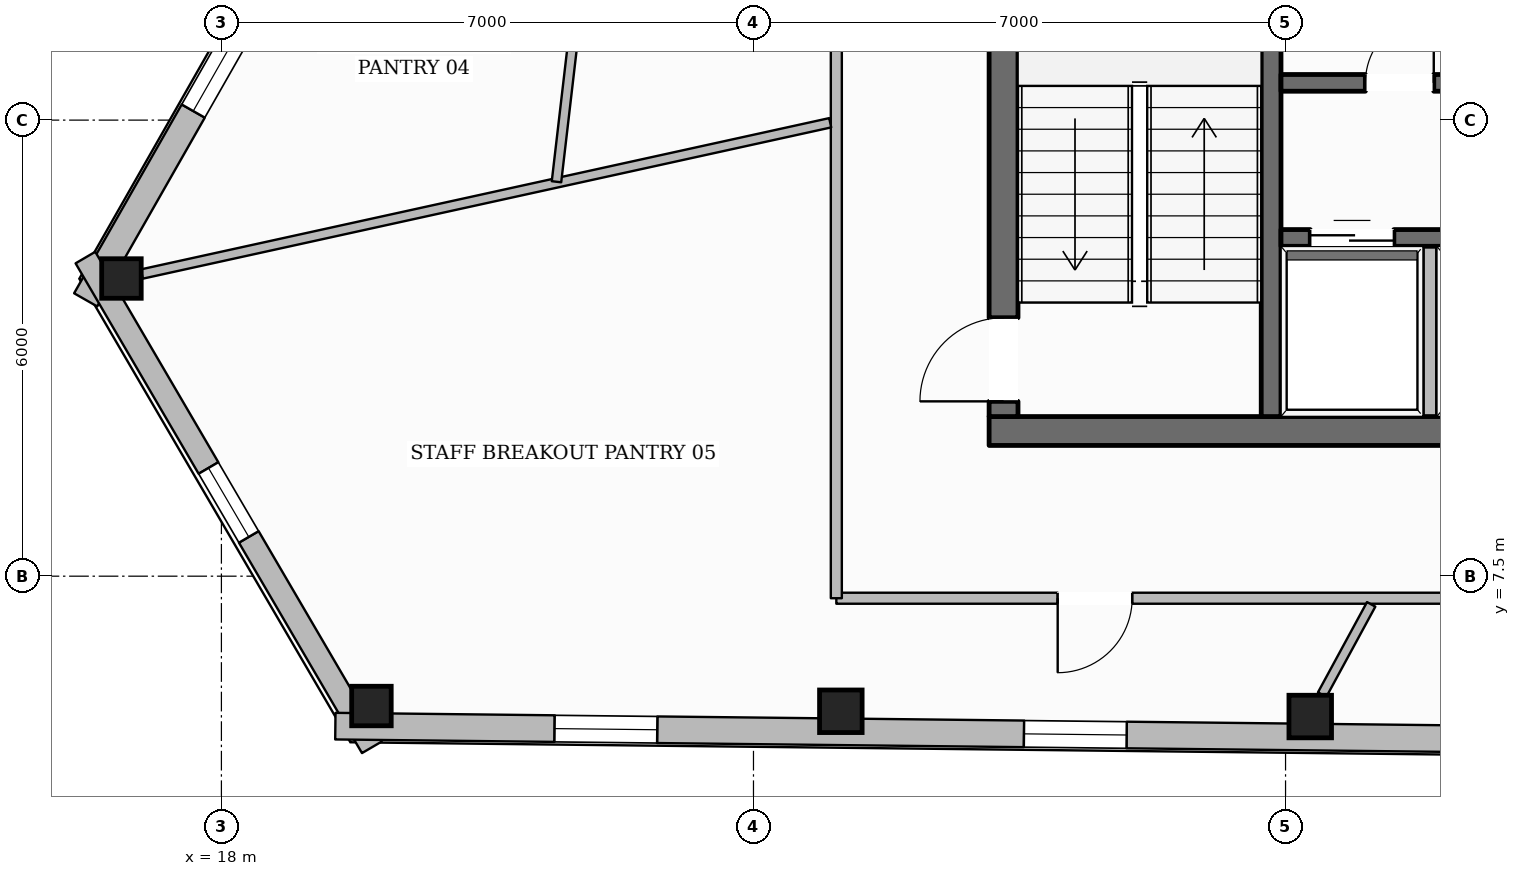
"""IFC4 building model, lengths in metres.
Left out: names, types, materials, properties, quantities, classifications, styles, units other than length and angle.
Written with IfcOpenShell. Run it as: python <this file> out.ifc"""

import sys

from ifc_helpers import new_model, si_unit, direction, frame, frame_2d, origin, origin_2d, place, context, subcontext, project, spatial, rectangle, hollow_rectangle, extrude, element, fill, save


model = new_model("IFC4")
c1 = context("Model", 3, precision=1e-05, world=origin(), true_north=direction((0.0, 1.0)))
c2 = subcontext(c1, "Body", "Model", "MODEL_VIEW")
j1 = project(units=[si_unit("LENGTHUNIT", "METRE"), si_unit("PLANEANGLEUNIT", "RADIAN")], contexts=[c1])
p1 = place(None, origin())
s1 = spatial("IfcSite", under=j1, at=p1, CompositionType="ELEMENT")
p2 = place(p1, origin())
s2 = spatial("IfcBuilding", under=s1, at=p2, CompositionType="ELEMENT")
p3 = place(p2, frame((0.0, 0.0, 254.9)))
s3 = spatial("IfcBuildingStorey", under=s2, at=p3, CompositionType="ELEMENT", Elevation=254.9)
p4 = place(p3, frame((28.1, 9.41, 0.0), z_axis=(0.0, 0.0, 1.0), x_axis=(1.0, 0.0, 0.0)))
e1 = element("IfcWall", 1, at=p4, inside=s3, PredefinedType="SOLIDWALL", context=c2, shape_type="SweptSolid", body=[
    extrude(rectangle(XDim=19.8, YDim=0.38, at=frame_2d((9.9, 0.0))), origin(), (0.0, 0.0, 1.0), 3.61),
])
p5 = place(p4, frame((10.4, 0.0, 0.0)))
e2 = element("IfcOpeningElement", 2, at=p5, cuts=e1, PredefinedType="OPENING", context=c2, shape_type="SweptSolid", body=[
    extrude(rectangle(XDim=1.4, YDim=2.2, at=frame_2d((0.7, 1.1))), frame((0.0, 0.2, 0.0), z_axis=(0.0, -1.0, 0.0), x_axis=(1.0, 0.0, 0.0)), (0.0, 0.0, 1.0), 0.4),
])
p6 = place(p3, frame((28.29, 9.6, 0.0), z_axis=(0.0, 0.0, 1.0), x_axis=(0.0, 1.0, 0.0)))
e3 = element("IfcWall", 3, at=p6, inside=s3, PredefinedType="SOLIDWALL", context=c2, shape_type="SweptSolid", body=[
    extrude(rectangle(XDim=13.0, YDim=0.38, at=frame_2d((6.5, 0.0))), origin(), (0.0, 0.0, 1.0), 3.61),
])
p7 = place(p6, frame((0.2, 0.0, 0.0)))
e4 = element("IfcOpeningElement", 4, at=p7, cuts=e3, PredefinedType="OPENING", context=c2, shape_type="SweptSolid", body=[
    extrude(rectangle(XDim=1.1, YDim=2.15, at=frame_2d((0.55, 1.075))), frame((0.0, 0.2, 0.0), z_axis=(0.0, -1.0, 0.0), x_axis=(1.0, 0.0, 0.0)), (0.0, 0.0, 1.0), 0.4),
])
p8 = place(p6, frame((8.4, 0.0, 0.0)))
e5 = element("IfcOpeningElement", 5, at=p8, cuts=e3, PredefinedType="OPENING", context=c2, shape_type="SweptSolid", body=[
    extrude(rectangle(XDim=0.9, YDim=2.1, at=frame_2d((0.45, 1.05))), frame((0.0, 0.2, 0.0), z_axis=(0.0, -1.0, 0.0), x_axis=(1.0, 0.0, 0.0)), (0.0, 0.0, 1.0), 0.4),
])
p9 = place(p3, frame((31.81, 9.6, 0.0), z_axis=(0.0, 0.0, 1.0), x_axis=(0.0, 1.0, 0.0)))
e6 = element("IfcWall", 6, at=p9, inside=s3, PredefinedType="SHEAR", context=c2, shape_type="SweptSolid", body=[
    extrude(rectangle(XDim=13.0, YDim=0.26, at=frame_2d((6.5, 0.0))), origin(), (0.0, 0.0, 1.0), 3.61),
])
p10 = place(p9, frame((10.925, 0.0, 0.0)))
e7 = element("IfcOpeningElement", 7, at=p10, cuts=e6, PredefinedType="OPENING", context=c2, shape_type="SweptSolid", body=[
    extrude(rectangle(XDim=1.25, YDim=2.25, at=frame_2d((0.625, 1.125))), frame((0.0, 0.14, 0.0), z_axis=(0.0, -1.0, 0.0), x_axis=(1.0, 0.0, 0.0)), (0.0, 0.0, 1.0), 0.28),
])
p11 = place(p3, frame((31.94, 13.99, 0.0), z_axis=(0.0, 0.0, 1.0), x_axis=(1.0, 0.0, 0.0)))
e8 = element("IfcWall", 8, at=p11, inside=s3, PredefinedType="SOLIDWALL", context=c2, shape_type="SweptSolid", body=[
    extrude(rectangle(XDim=12.12, YDim=0.22, at=frame_2d((6.06, 0.0))), origin(), (0.0, 0.0, 1.0), 3.61),
])
p12 = place(p11, frame((1.11, 0.0, 0.0)))
e9 = element("IfcOpeningElement", 9, at=p12, cuts=e8, PredefinedType="OPENING", context=c2, shape_type="SweptSolid", body=[
    extrude(rectangle(XDim=0.9, YDim=2.1, at=frame_2d((0.45, 1.05))), frame((0.0, 0.12, 0.0), z_axis=(0.0, -1.0, 0.0), x_axis=(1.0, 0.0, 0.0)), (0.0, 0.0, 1.0), 0.24),
])
p13 = place(p11, frame((5.16, 0.0, 0.0)))
e10 = element("IfcOpeningElement", 10, at=p13, cuts=e8, PredefinedType="OPENING", context=c2, shape_type="SweptSolid", body=[
    extrude(rectangle(XDim=0.9, YDim=2.1, at=frame_2d((0.45, 1.05))), frame((0.0, 0.12, 0.0), z_axis=(0.0, -1.0, 0.0), x_axis=(1.0, 0.0, 0.0)), (0.0, 0.0, 1.0), 0.24),
])
p14 = place(p11, frame((9.61, 0.0, 0.0)))
e11 = element("IfcOpeningElement", 11, at=p14, cuts=e8, PredefinedType="OPENING", context=c2, shape_type="SweptSolid", body=[
    extrude(rectangle(XDim=0.9, YDim=2.1, at=frame_2d((0.45, 1.05))), frame((0.0, 0.12, 0.0), z_axis=(0.0, -1.0, 0.0), x_axis=(1.0, 0.0, 0.0)), (0.0, 0.0, 1.0), 0.24),
])
p15 = place(p3, frame((31.94, 11.95, 0.0), z_axis=(0.0, 0.0, 1.0), x_axis=(1.0, 0.0, 0.0)))
e12 = element("IfcWall", 12, at=p15, inside=s3, PredefinedType="SOLIDWALL", context=c2, shape_type="SweptSolid", body=[
    extrude(rectangle(XDim=6.19, YDim=0.22, at=frame_2d((3.095, 0.0))), origin(), (0.0, 0.0, 1.0), 3.61),
])
p16 = place(p15, frame((0.385, 0.0, 0.0)))
e13 = element("IfcOpeningElement", 13, at=p16, cuts=e12, PredefinedType="OPENING", context=c2, shape_type="SweptSolid", body=[
    extrude(rectangle(XDim=1.1, YDim=2.2, at=frame_2d((0.55, 1.1))), frame((0.0, 0.12, 0.0), z_axis=(0.0, -1.0, 0.0), x_axis=(1.0, 0.0, 0.0)), (0.0, 0.0, 1.0), 0.24),
])
p17 = place(p15, frame((2.435, 0.0, 0.0)))
e14 = element("IfcOpeningElement", 14, at=p17, cuts=e12, PredefinedType="OPENING", context=c2, shape_type="SweptSolid", body=[
    extrude(rectangle(XDim=1.1, YDim=2.2, at=frame_2d((0.55, 1.1))), frame((0.0, 0.12, 0.0), z_axis=(0.0, -1.0, 0.0), x_axis=(1.0, 0.0, 0.0)), (0.0, 0.0, 1.0), 0.24),
])
p18 = place(p15, frame((4.485, 0.0, 0.0)))
e15 = element("IfcOpeningElement", 15, at=p18, cuts=e12, PredefinedType="OPENING", context=c2, shape_type="SweptSolid", body=[
    extrude(rectangle(XDim=1.1, YDim=2.2, at=frame_2d((0.55, 1.1))), frame((0.0, 0.12, 0.0), z_axis=(0.0, -1.0, 0.0), x_axis=(1.0, 0.0, 0.0)), (0.0, 0.0, 1.0), 0.24),
])
for number, where, z_axis, x_axis in (
    (16, (16.685, 11.416, 0.0), (0.0, 0.0, 1.0), (1.0, 0.0, 0.0)),
    (17, (19.974, 5.792, 0.0), (0.0, 0.0, 1.0), (1.0, 0.0, 0.0)),
):
    element("IfcColumn", number, at=place(p3, frame(where, z_axis=z_axis, x_axis=x_axis)), inside=s3, PredefinedType="COLUMN", context=c2, shape_type="SweptSolid", body=[
        extrude(hollow_rectangle(XDim=0.52, YDim=0.52, WallThickness=0.024, at=origin_2d()), origin(), (0.0, 0.0, 1.0), 3.61),
    ])
for number, where, z_axis, x_axis in (
    (18, (26.149, 5.723, 0.0), (0.0, 0.0, 1.0), (1.0, 0.0, 0.0)),
    (19, (32.325, 5.654, 0.0), (0.0, 0.0, 1.0), (1.0, 0.0, 0.0)),
):
    element("IfcColumn", number, at=place(p3, frame(where, z_axis=z_axis, x_axis=x_axis)), inside=s3, PredefinedType="COLUMN", context=c2, shape_type="SweptSolid", body=[
        extrude(hollow_rectangle(XDim=0.56, YDim=0.56, WallThickness=0.025, at=origin_2d()), origin(), (0.0, 0.0, 1.0), 3.61),
    ])
p19 = place(p3, frame((16.214, 11.135, 0.0), z_axis=(0.0, 0.0, 1.0), x_axis=(0.49510347201, 0.868834018673, 0.0)))
e20 = element("IfcWall", 20, at=p19, inside=s3, PredefinedType="STANDARD", context=c2, shape_type="SweptSolid", body=[
    extrude(rectangle(XDim=37.643, YDim=0.35, at=frame_2d((18.822, 0.0))), origin(), (0.0, 0.0, 1.0), 3.196),
])
p20 = place(p19, frame((33.429, 0.0, 0.65)))
e21 = element("IfcOpeningElement", 21, at=p20, cuts=e20, PredefinedType="OPENING", context=c2, shape_type="SweptSolid", body=[
    extrude(rectangle(XDim=1.35, YDim=1.75, at=frame_2d((0.675, 0.875))), frame((0.0, 0.185, 0.0), z_axis=(0.0, -1.0, 0.0), x_axis=(1.0, 0.0, 0.0)), (0.0, 0.0, 1.0), 0.37),
])
p21 = place(p19, frame((27.315, 0.0, 0.65)))
e22 = element("IfcOpeningElement", 22, at=p21, cuts=e20, PredefinedType="OPENING", context=c2, shape_type="SweptSolid", body=[
    extrude(rectangle(XDim=1.35, YDim=1.75, at=frame_2d((0.675, 0.875))), frame((0.0, 0.185, 0.0), z_axis=(0.0, -1.0, 0.0), x_axis=(1.0, 0.0, 0.0)), (0.0, 0.0, 1.0), 0.37),
])
p22 = place(p19, frame((15.087, 0.0, 0.65)))
e23 = element("IfcOpeningElement", 23, at=p22, cuts=e20, PredefinedType="OPENING", context=c2, shape_type="SweptSolid", body=[
    extrude(rectangle(XDim=1.35, YDim=1.75, at=frame_2d((0.675, 0.875))), frame((0.0, 0.185, 0.0), z_axis=(0.0, -1.0, 0.0), x_axis=(1.0, 0.0, 0.0)), (0.0, 0.0, 1.0), 0.37),
])
p23 = place(p19, frame((8.973, 0.0, 0.65)))
e24 = element("IfcOpeningElement", 24, at=p23, cuts=e20, PredefinedType="OPENING", context=c2, shape_type="SweptSolid", body=[
    extrude(rectangle(XDim=1.35, YDim=1.75, at=frame_2d((0.675, 0.875))), frame((0.0, 0.185, 0.0), z_axis=(0.0, -1.0, 0.0), x_axis=(1.0, 0.0, 0.0)), (0.0, 0.0, 1.0), 0.37),
])
p24 = place(p19, frame((2.859, 0.0, 0.65)))
e25 = element("IfcOpeningElement", 25, at=p24, cuts=e20, PredefinedType="OPENING", context=c2, shape_type="SweptSolid", body=[
    extrude(rectangle(XDim=1.35, YDim=1.75, at=frame_2d((0.675, 0.875))), frame((0.0, 0.185, 0.0), z_axis=(0.0, -1.0, 0.0), x_axis=(1.0, 0.0, 0.0)), (0.0, 0.0, 1.0), 0.37),
])
p25 = place(p3, frame((19.979, 5.248, 0.0), z_axis=(0.0, 0.0, 1.0), x_axis=(-0.50480008765, 0.863236277915, 0.0)))
e26 = element("IfcWall", 26, at=p25, inside=s3, PredefinedType="STANDARD", context=c2, shape_type="SweptSolid", body=[
    extrude(rectangle(XDim=7.464, YDim=0.3, at=frame_2d((3.732, 0.0))), origin(), (0.0, 0.0, 1.0), 3.196),
])
p26 = place(p25, frame((3.207, 0.0, 0.65)))
e27 = element("IfcOpeningElement", 27, at=p26, cuts=e26, PredefinedType="OPENING", context=c2, shape_type="SweptSolid", body=[
    extrude(rectangle(XDim=1.05, YDim=1.7, at=frame_2d((0.525, 0.85))), frame((0.0, 0.16, 0.0), z_axis=(0.0, -1.0, 0.0), x_axis=(1.0, 0.0, 0.0)), (0.0, 0.0, 1.0), 0.32),
])
p27 = place(p3, frame((57.506, 5.102, 0.0), z_axis=(0.0, 0.0, 1.0), x_axis=(-0.999937327785, 0.011195557226, 0.0)))
e28 = element("IfcWall", 28, at=p27, inside=s3, PredefinedType="STANDARD", context=c2, shape_type="SweptSolid", body=[
    extrude(rectangle(XDim=38.01, YDim=0.35, at=frame_2d((19.005, 0.0))), origin(), (0.0, 0.0, 1.0), 3.196),
])
p28 = place(p27, frame((33.775, 0.0, 0.65)))
e29 = element("IfcOpeningElement", 29, at=p28, cuts=e28, PredefinedType="OPENING", context=c2, shape_type="SweptSolid", body=[
    extrude(rectangle(XDim=1.35, YDim=1.75, at=frame_2d((0.675, 0.875))), frame((0.0, 0.185, 0.0), z_axis=(0.0, -1.0, 0.0), x_axis=(1.0, 0.0, 0.0)), (0.0, 0.0, 1.0), 0.37),
])
p29 = place(p27, frame((27.599, 0.0, 0.65)))
e30 = element("IfcOpeningElement", 30, at=p29, cuts=e28, PredefinedType="OPENING", context=c2, shape_type="SweptSolid", body=[
    extrude(rectangle(XDim=1.35, YDim=1.75, at=frame_2d((0.675, 0.875))), frame((0.0, 0.185, 0.0), z_axis=(0.0, -1.0, 0.0), x_axis=(1.0, 0.0, 0.0)), (0.0, 0.0, 1.0), 0.37),
])
p30 = place(p27, frame((15.247, 0.0, 0.65)))
e31 = element("IfcOpeningElement", 31, at=p30, cuts=e28, PredefinedType="OPENING", context=c2, shape_type="SweptSolid", body=[
    extrude(rectangle(XDim=1.35, YDim=1.75, at=frame_2d((0.675, 0.875))), frame((0.0, 0.185, 0.0), z_axis=(0.0, -1.0, 0.0), x_axis=(1.0, 0.0, 0.0)), (0.0, 0.0, 1.0), 0.37),
])
p31 = place(p27, frame((9.071, 0.0, 0.65)))
e32 = element("IfcOpeningElement", 32, at=p31, cuts=e28, PredefinedType="OPENING", context=c2, shape_type="SweptSolid", body=[
    extrude(rectangle(XDim=1.35, YDim=1.75, at=frame_2d((0.675, 0.875))), frame((0.0, 0.185, 0.0), z_axis=(0.0, -1.0, 0.0), x_axis=(1.0, 0.0, 0.0)), (0.0, 0.0, 1.0), 0.37),
])
p32 = place(p27, frame((2.896, 0.0, 0.65)))
e33 = element("IfcOpeningElement", 33, at=p32, cuts=e28, PredefinedType="OPENING", context=c2, shape_type="SweptSolid", body=[
    extrude(rectangle(XDim=1.35, YDim=1.75, at=frame_2d((0.675, 0.875))), frame((0.0, 0.185, 0.0), z_axis=(0.0, -1.0, 0.0), x_axis=(1.0, 0.0, 0.0)), (0.0, 0.0, 1.0), 0.37),
])
p33 = place(p3, frame((33.9, 9.49, 0.0), z_axis=(0.0, 0.0, 1.0), x_axis=(0.0, 1.0, 0.0)))
e34 = element("IfcWall", 34, at=p33, inside=s3, PredefinedType="PARTITIONING", context=c2, shape_type="SweptSolid", body=[
    extrude(rectangle(XDim=2.35, YDim=0.165, at=frame_2d((1.175, 0.0))), origin(), (0.0, 0.0, 1.0), 3.61),
])
p34 = place(p3, frame((49.91, 7.21, 0.0), z_axis=(0.0, 0.0, 1.0), x_axis=(-1.0, 0.0, 0.0)))
e35 = element("IfcWall", 35, at=p34, inside=s3, PredefinedType="PARTITIONING", context=c2, shape_type="SweptSolid", body=[
    extrude(rectangle(XDim=23.82, YDim=0.145, at=frame_2d((11.91, 0.0))), origin(), (0.0, 0.0, 1.0), 3.61),
])
p35 = place(p34, frame((19.928, 0.0, 0.0)))
e36 = element("IfcOpeningElement", 36, at=p35, cuts=e35, PredefinedType="OPENING", context=c2, shape_type="SweptSolid", body=[
    extrude(rectangle(XDim=0.98, YDim=2.15, at=frame_2d((0.49, 1.075))), frame((0.0, 0.083, 0.0), z_axis=(0.0, -1.0, 0.0), x_axis=(1.0, 0.0, 0.0)), (0.0, 0.0, 1.0), 0.165),
])
p36 = place(p34, frame((8.487, 0.0, 0.0)))
e37 = element("IfcOpeningElement", 37, at=p36, cuts=e35, PredefinedType="OPENING", context=c2, shape_type="SweptSolid", body=[
    extrude(rectangle(XDim=0.98, YDim=2.15, at=frame_2d((0.49, 1.075))), frame((0.0, 0.083, 0.0), z_axis=(0.0, -1.0, 0.0), x_axis=(1.0, 0.0, 0.0)), (0.0, 0.0, 1.0), 0.165),
])
p37 = place(p3, frame((26.09, 7.21, 0.0), z_axis=(0.0, 0.0, 1.0), x_axis=(0.0, 1.0, 0.0)))
e38 = element("IfcWall", 38, at=p37, inside=s3, PredefinedType="PARTITIONING", context=c2, shape_type="SweptSolid", body=[
    extrude(rectangle(XDim=17.78, YDim=0.145, at=frame_2d((8.89, 0.0))), origin(), (0.0, 0.0, 1.0), 3.349),
])
p38 = place(p37, frame((11.443, 0.0, 0.0)))
e39 = element("IfcOpeningElement", 39, at=p38, cuts=e38, PredefinedType="OPENING", context=c2, shape_type="SweptSolid", body=[
    extrude(rectangle(XDim=0.98, YDim=2.15, at=frame_2d((0.49, 1.075))), frame((0.0, 0.083, 0.0), z_axis=(0.0, -1.0, 0.0), x_axis=(1.0, 0.0, 0.0)), (0.0, 0.0, 1.0), 0.165),
])
p39 = place(p3, frame((26.01, 13.465, 0.0), z_axis=(0.0, 0.0, 1.0), x_axis=(-0.976700346334, -0.214607626778, 0.0)))
e40 = element("IfcWall", 40, at=p39, inside=s3, PredefinedType="PARTITIONING", context=c2, shape_type="SweptSolid", body=[
    extrude(rectangle(XDim=9.273, YDim=0.125, at=frame_2d((4.636, 0.0))), origin(), (0.0, 0.0, 1.0), 3.246),
])
p40 = place(p3, frame((33.127, 7.129, 0.0), z_axis=(0.0, 0.0, 1.0), x_axis=(-0.47743452788, -0.878667327029, 0.0)))
e41 = element("IfcWall", 41, at=p40, inside=s3, PredefinedType="PARTITIONING", context=c2, shape_type="SweptSolid", body=[
    extrude(rectangle(XDim=1.352, YDim=0.125, at=frame_2d((0.676, 0.0))), origin(), (0.0, 0.0, 1.0), 3.61),
])
p41 = place(p3, frame((23.733, 24.027, 0.0), z_axis=(0.0, 0.0, 1.0), x_axis=(-0.116028401935, -0.993245896012, 0.0)))
e42 = element("IfcWall", 42, at=p41, inside=s3, PredefinedType="PARTITIONING", context=c2, shape_type="SweptSolid", body=[
    extrude(rectangle(XDim=11.415, YDim=0.125, at=frame_2d((5.708, 0.0))), origin(), (0.0, 0.0, 1.0), 3.199),
])
p42 = place(p41, frame((5.142, 0.0, 0.0)))
e43 = element("IfcOpeningElement", 43, at=p42, cuts=e42, PredefinedType="OPENING", context=c2, shape_type="SweptSolid", body=[
    extrude(rectangle(XDim=0.98, YDim=2.15, at=frame_2d((0.49, 1.075))), frame((0.0, 0.073, 0.0), z_axis=(0.0, -1.0, 0.0), x_axis=(1.0, 0.0, 0.0)), (0.0, 0.0, 1.0), 0.145),
])
p43 = place(p24, origin())
e44 = element("IfcWindow", 44, at=p43, inside=s3, PartitioningType="SINGLE_PANEL", PredefinedType="WINDOW", context=c2, shape_type="SweptSolid", body=[
    extrude(rectangle(XDim=1.35, YDim=1.75, at=frame_2d((0.675, 0.875))), frame((0.0, 0.03, 0.0), z_axis=(0.0, -1.0, 0.0), x_axis=(1.0, 0.0, 0.0)), (0.0, 0.0, 1.0), 0.06),
])
fill(e25, e44)
p44 = place(p28, origin())
e45 = element("IfcWindow", 45, at=p44, inside=s3, PartitioningType="SINGLE_PANEL", PredefinedType="WINDOW", context=c2, shape_type="SweptSolid", body=[
    extrude(rectangle(XDim=1.35, YDim=1.75, at=frame_2d((0.675, 0.875))), frame((0.0, 0.03, 0.0), z_axis=(0.0, -1.0, 0.0), x_axis=(1.0, 0.0, 0.0)), (0.0, 0.0, 1.0), 0.06),
])
fill(e29, e45)
p45 = place(p29, origin())
e46 = element("IfcWindow", 46, at=p45, inside=s3, PartitioningType="SINGLE_PANEL", PredefinedType="WINDOW", context=c2, shape_type="SweptSolid", body=[
    extrude(rectangle(XDim=1.35, YDim=1.75, at=frame_2d((0.675, 0.875))), frame((0.0, 0.03, 0.0), z_axis=(0.0, -1.0, 0.0), x_axis=(1.0, 0.0, 0.0)), (0.0, 0.0, 1.0), 0.06),
])
fill(e30, e46)
p46 = place(p26, origin())
e47 = element("IfcWindow", 47, at=p46, inside=s3, PartitioningType="SINGLE_PANEL", PredefinedType="WINDOW", context=c2, shape_type="SweptSolid", body=[
    extrude(rectangle(XDim=1.05, YDim=1.7, at=frame_2d((0.525, 0.85))), frame((0.0, 0.03, 0.0), z_axis=(0.0, -1.0, 0.0), x_axis=(1.0, 0.0, 0.0)), (0.0, 0.0, 1.0), 0.06),
])
fill(e27, e47)
p47 = place(p7, origin())
e48 = element("IfcDoor", 48, at=p47, inside=s3, OperationType="SINGLE_SWING_LEFT", PredefinedType="DOOR", context=c2, shape_type="SweptSolid", body=[
    extrude(rectangle(XDim=1.1, YDim=2.15, at=frame_2d((0.55, 1.075))), frame((0.0, 0.025, 0.0), z_axis=(0.0, -1.0, 0.0), x_axis=(1.0, 0.0, 0.0)), (0.0, 0.0, 1.0), 0.05),
])
fill(e4, e48)
p48 = place(p16, origin())
e49 = element("IfcDoor", 49, at=p48, inside=s3, OperationType="DOUBLE_DOOR_SLIDING", PredefinedType="DOOR", context=c2, shape_type="SweptSolid", body=[
    extrude(rectangle(XDim=1.1, YDim=2.2, at=frame_2d((0.55, 1.1))), frame((0.0, 0.025, 0.0), z_axis=(0.0, -1.0, 0.0), x_axis=(1.0, 0.0, 0.0)), (0.0, 0.0, 1.0), 0.05),
])
fill(e13, e49)
p49 = place(p12, origin())
e50 = element("IfcDoor", 50, at=p49, inside=s3, OperationType="SINGLE_SWING_RIGHT", PredefinedType="DOOR", context=c2, shape_type="SweptSolid", body=[
    extrude(rectangle(XDim=0.9, YDim=2.1, at=frame_2d((0.45, 1.05))), frame((0.0, 0.025, 0.0), z_axis=(0.0, -1.0, 0.0), x_axis=(1.0, 0.0, 0.0)), (0.0, 0.0, 1.0), 0.05),
])
fill(e9, e50)
p50 = place(p35, origin())
e51 = element("IfcDoor", 51, at=p50, inside=s3, OperationType="SINGLE_SWING_RIGHT", PredefinedType="DOOR", context=c2, shape_type="SweptSolid", body=[
    extrude(rectangle(XDim=0.98, YDim=2.15, at=frame_2d((0.49, 1.075))), frame((0.0, 0.025, 0.0), z_axis=(0.0, -1.0, 0.0), x_axis=(1.0, 0.0, 0.0)), (0.0, 0.0, 1.0), 0.05),
])
fill(e36, e51)
save(model, sys.argv[1])
